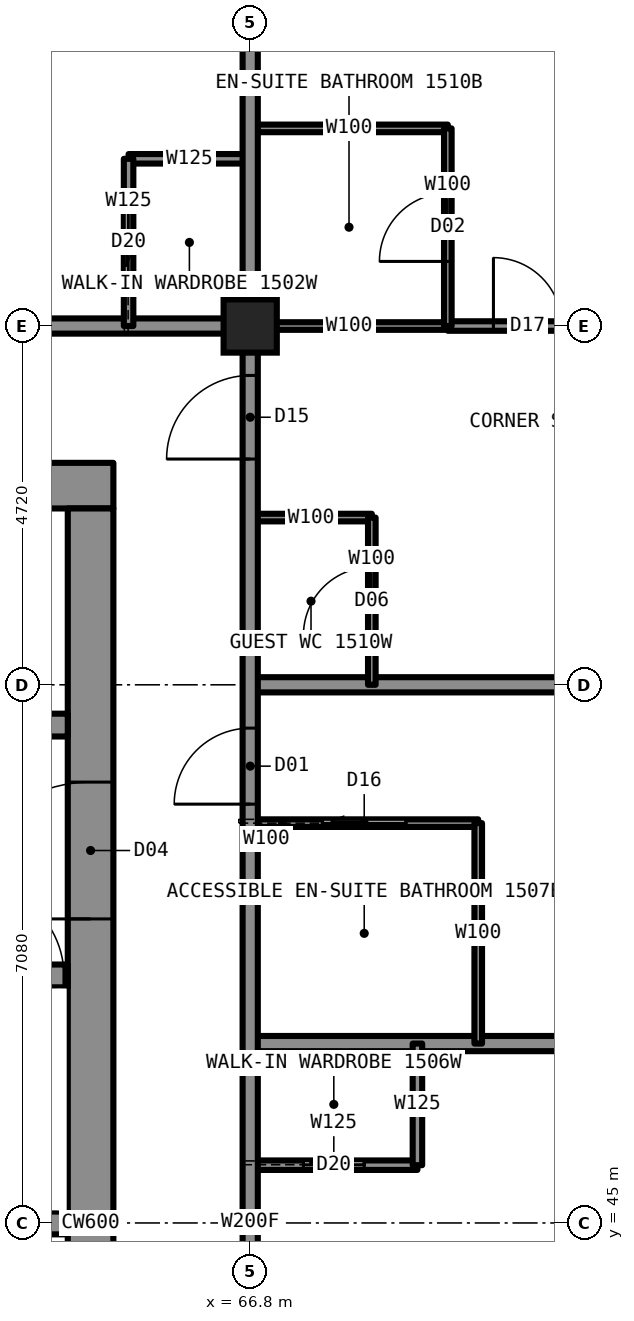
"""IFC4 building model, lengths in metres.
Left out: names, types, materials, properties, quantities, classifications, styles, units other than length and angle.
Written with IfcOpenShell. Run it as: python <this file> out.ifc"""

import sys

from ifc_helpers import new_model, si_unit, direction, frame, frame_2d, origin, origin_2d, place, context, subcontext, project, spatial, rectangle, hollow_rectangle, extrude, element, fill, save


model = new_model("IFC4")
c1 = context("Model", 3, precision=1e-05, world=origin(), true_north=direction((0.0, 1.0)))
c2 = subcontext(c1, "Body", "Model", "MODEL_VIEW")
j1 = project(units=[si_unit("LENGTHUNIT", "METRE"), si_unit("PLANEANGLEUNIT", "RADIAN")], contexts=[c1])
p1 = place(None, origin())
s1 = spatial("IfcSite", under=j1, at=p1, CompositionType="ELEMENT")
p2 = place(p1, origin())
s2 = spatial("IfcBuilding", under=s1, at=p2, CompositionType="ELEMENT")
p3 = place(p2, frame((0.0, 0.0, 60.0)))
s3 = spatial("IfcBuildingStorey", under=s2, at=p3, CompositionType="ELEMENT", Elevation=60.0)
p4 = place(p3, frame((66.8, 56.8, 0.0), z_axis=(0.0, 0.0, 1.0), x_axis=(1.0, 0.0, 0.0)))
e1 = element("IfcColumn", 1, at=p4, inside=s3, PredefinedType="COLUMN", context=c2, shape_type="SweptSolid", body=[
    extrude(hollow_rectangle(XDim=0.7, YDim=0.7, WallThickness=0.06, at=origin_2d()), origin(), (0.0, 0.0, 1.0), 3.5),
])
p5 = place(p3, frame((45.0, 54.7, 0.0), z_axis=(0.0, 0.0, 1.0), x_axis=(1.0, 0.0, 0.0)))
e2 = element("IfcWall", 2, at=p5, inside=s3, PredefinedType="SHEAR", context=c2, shape_type="SweptSolid", body=[
    extrude(rectangle(XDim=20.0, YDim=0.6, at=frame_2d((10.0, 0.0))), origin(), (0.0, 0.0, 1.0), 3.5),
])
p6 = place(p3, frame((64.7, 35.6, 0.0), z_axis=(0.0, 0.0, 1.0), x_axis=(0.0, 1.0, 0.0)))
e3 = element("IfcWall", 3, at=p6, inside=s3, PredefinedType="SHEAR", context=c2, shape_type="SweptSolid", body=[
    extrude(rectangle(XDim=18.8, YDim=0.6, at=frame_2d((9.4, 0.0))), origin(), (0.0, 0.0, 1.0), 3.5),
])
p7 = place(p6, frame((13.4, 0.0, 0.0)))
e4 = element("IfcOpeningElement", 4, at=p7, cuts=e3, PredefinedType="OPENING", context=c2, shape_type="SweptSolid", body=[
    extrude(rectangle(XDim=1.8, YDim=2.2, at=frame_2d((0.9, 1.1))), frame((0.0, 0.31, 0.0), z_axis=(0.0, -1.0, 0.0), x_axis=(1.0, 0.0, 0.0)), (0.0, 0.0, 1.0), 0.62),
])
p8 = place(p6, frame((3.6, 0.0, 0.0)))
e5 = element("IfcOpeningElement", 5, at=p8, cuts=e3, PredefinedType="OPENING", context=c2, shape_type="SweptSolid", body=[
    extrude(rectangle(XDim=1.8, YDim=2.2, at=frame_2d((0.9, 1.1))), frame((0.0, 0.31, 0.0), z_axis=(0.0, -1.0, 0.0), x_axis=(1.0, 0.0, 0.0)), (0.0, 0.0, 1.0), 0.62),
])
p9 = place(p3, frame((45.6, 51.55, 0.0), z_axis=(0.0, 0.0, 1.0), x_axis=(1.0, 0.0, 0.0)))
e6 = element("IfcWall", 6, at=p9, inside=s3, PredefinedType="SHEAR", context=c2, shape_type="SweptSolid", body=[
    extrude(rectangle(XDim=18.8, YDim=0.3, at=frame_2d((9.4, 0.0))), origin(), (0.0, 0.0, 1.0), 3.5),
])
p10 = place(p9, frame((0.7, 0.0, 0.0)))
e7 = element("IfcOpeningElement", 7, at=p10, cuts=e6, PredefinedType="OPENING", context=c2, shape_type="SweptSolid", body=[
    extrude(rectangle(XDim=1.1, YDim=2.2, at=frame_2d((0.55, 1.1))), frame((0.0, 0.16, 0.0), z_axis=(0.0, -1.0, 0.0), x_axis=(1.0, 0.0, 0.0)), (0.0, 0.0, 1.0), 0.32),
])
p11 = place(p9, frame((3.4, 0.0, 0.0)))
e8 = element("IfcOpeningElement", 8, at=p11, cuts=e6, PredefinedType="OPENING", context=c2, shape_type="SweptSolid", body=[
    extrude(rectangle(XDim=1.1, YDim=2.2, at=frame_2d((0.55, 1.1))), frame((0.0, 0.16, 0.0), z_axis=(0.0, -1.0, 0.0), x_axis=(1.0, 0.0, 0.0)), (0.0, 0.0, 1.0), 0.32),
])
p12 = place(p9, frame((6.1, 0.0, 0.0)))
e9 = element("IfcOpeningElement", 9, at=p12, cuts=e6, PredefinedType="OPENING", context=c2, shape_type="SweptSolid", body=[
    extrude(rectangle(XDim=1.1, YDim=2.2, at=frame_2d((0.55, 1.1))), frame((0.0, 0.16, 0.0), z_axis=(0.0, -1.0, 0.0), x_axis=(1.0, 0.0, 0.0)), (0.0, 0.0, 1.0), 0.32),
])
p13 = place(p9, frame((8.8, 0.0, 0.0)))
e10 = element("IfcOpeningElement", 10, at=p13, cuts=e6, PredefinedType="OPENING", context=c2, shape_type="SweptSolid", body=[
    extrude(rectangle(XDim=1.1, YDim=2.2, at=frame_2d((0.55, 1.1))), frame((0.0, 0.16, 0.0), z_axis=(0.0, -1.0, 0.0), x_axis=(1.0, 0.0, 0.0)), (0.0, 0.0, 1.0), 0.32),
])
p14 = place(p9, frame((11.6, 0.0, 0.0)))
e11 = element("IfcOpeningElement", 11, at=p14, cuts=e6, PredefinedType="OPENING", context=c2, shape_type="SweptSolid", body=[
    extrude(rectangle(XDim=1.1, YDim=2.2, at=frame_2d((0.55, 1.1))), frame((0.0, 0.16, 0.0), z_axis=(0.0, -1.0, 0.0), x_axis=(1.0, 0.0, 0.0)), (0.0, 0.0, 1.0), 0.32),
])
p15 = place(p9, frame((14.3, 0.0, 0.0)))
e12 = element("IfcOpeningElement", 12, at=p15, cuts=e6, PredefinedType="OPENING", context=c2, shape_type="SweptSolid", body=[
    extrude(rectangle(XDim=1.1, YDim=2.2, at=frame_2d((0.55, 1.1))), frame((0.0, 0.16, 0.0), z_axis=(0.0, -1.0, 0.0), x_axis=(1.0, 0.0, 0.0)), (0.0, 0.0, 1.0), 0.32),
])
p16 = place(p3, frame((56.2, 48.25, 0.0), z_axis=(0.0, 0.0, 1.0), x_axis=(1.0, 0.0, 0.0)))
e13 = element("IfcWall", 13, at=p16, inside=s3, PredefinedType="SHEAR", context=c2, shape_type="SweptSolid", body=[
    extrude(rectangle(XDim=8.2, YDim=0.3, at=frame_2d((4.1, 0.0))), origin(), (0.0, 0.0, 1.0), 3.5),
])
p17 = place(p16, frame((6.95, 0.0, 0.0)))
e14 = element("IfcOpeningElement", 14, at=p17, cuts=e13, PredefinedType="OPENING", context=c2, shape_type="SweptSolid", body=[
    extrude(rectangle(XDim=1.2, YDim=2.2, at=frame_2d((0.6, 1.1))), frame((0.0, 0.16, 0.0), z_axis=(0.0, -1.0, 0.0), x_axis=(1.0, 0.0, 0.0)), (0.0, 0.0, 1.0), 0.32),
])
p18 = place(p3, frame((56.5, 45.0, 0.0), z_axis=(0.0, 0.0, 1.0), x_axis=(1.0, 0.0, 0.0)))
e15 = element("IfcWall", 15, at=p18, inside=s3, PredefinedType="SHEAR", context=c2, shape_type="SweptSolid", body=[
    extrude(rectangle(XDim=7.9, YDim=0.3, at=frame_2d((3.95, 0.0))), origin(), (0.0, 0.0, 1.0), 3.5),
])
p19 = place(p3, frame((66.8, 45.76, 0.0), z_axis=(0.0, 0.0, 1.0), x_axis=(1.0, 0.0, 0.0)))
e16 = element("IfcWall", 16, at=p19, inside=s3, PredefinedType="PARTITIONING", context=c2, shape_type="SweptSolid", body=[
    extrude(rectangle(XDim=2.2, YDim=0.125, at=frame_2d((1.1, 0.0))), origin(), (0.0, 0.0, 1.0), 3.33),
])
p20 = place(p19, frame((0.7, 0.0, 0.0)))
e17 = element("IfcOpeningElement", 17, at=p20, cuts=e16, PredefinedType="OPENING", context=c2, shape_type="SweptSolid", body=[
    extrude(rectangle(XDim=0.8, YDim=2.1, at=frame_2d((0.4, 1.05))), frame((0.0, 0.073, 0.0), z_axis=(0.0, -1.0, 0.0), x_axis=(1.0, 0.0, 0.0)), (0.0, 0.0, 1.0), 0.145),
])
p21 = place(p3, frame((66.8, 56.8, 0.0), z_axis=(0.0, 0.0, 1.0), x_axis=(1.0, 0.0, 0.0)))
e18 = element("IfcWall", 18, at=p21, inside=s3, PredefinedType="PARTITIONING", context=c2, shape_type="SweptSolid", body=[
    extrude(rectangle(XDim=2.6, YDim=0.1, at=frame_2d((1.3, 0.0))), origin(), (0.0, 0.0, 1.0), 2.573),
])
p22 = place(p3, frame((43.2, 56.8, 0.0), z_axis=(0.0, 0.0, 1.0), x_axis=(1.0, 0.0, 0.0)))
e19 = element("IfcWall", 19, at=p22, inside=s3, PredefinedType="PARTITIONING", context=c2, shape_type="SweptSolid", body=[
    extrude(rectangle(XDim=23.6, YDim=0.2, at=frame_2d((11.8, 0.0))), origin(), (0.0, 0.0, 1.0), 3.33),
])
p23 = place(p22, frame((1.85, 0.0, 0.0)))
e20 = element("IfcOpeningElement", 20, at=p23, cuts=e19, PredefinedType="OPENING", context=c2, shape_type="SweptSolid", body=[
    extrude(rectangle(XDim=1.1, YDim=2.2, at=frame_2d((0.55, 1.1))), frame((0.0, 0.11, 0.0), z_axis=(0.0, -1.0, 0.0), x_axis=(1.0, 0.0, 0.0)), (0.0, 0.0, 1.0), 0.22),
])
p24 = place(p22, frame((17.16, 0.0, 0.0)))
e21 = element("IfcOpeningElement", 21, at=p24, cuts=e19, PredefinedType="OPENING", context=c2, shape_type="SweptSolid", body=[
    extrude(rectangle(XDim=1.0, YDim=2.2, at=frame_2d((0.5, 1.1))), frame((0.0, 0.11, 0.0), z_axis=(0.0, -1.0, 0.0), x_axis=(1.0, 0.0, 0.0)), (0.0, 0.0, 1.0), 0.22),
])
p25 = place(p3, frame((69.4, 56.8, 0.0), z_axis=(0.0, 0.0, 1.0), x_axis=(1.0, 0.0, 0.0)))
e22 = element("IfcWall", 22, at=p25, inside=s3, PredefinedType="PARTITIONING", context=c2, shape_type="SweptSolid", body=[
    extrude(rectangle(XDim=7.3, YDim=0.125, at=frame_2d((3.65, 0.0))), origin(), (0.0, 0.0, 1.0), 2.573),
])
p26 = place(p25, frame((0.6, 0.0, 0.0)))
e23 = element("IfcOpeningElement", 23, at=p26, cuts=e22, PredefinedType="OPENING", context=c2, shape_type="SweptSolid", body=[
    extrude(rectangle(XDim=0.9, YDim=2.2, at=frame_2d((0.45, 1.1))), frame((0.0, 0.073, 0.0), z_axis=(0.0, -1.0, 0.0), x_axis=(1.0, 0.0, 0.0)), (0.0, 0.0, 1.0), 0.145),
])
p27 = place(p25, frame((4.4, 0.0, 0.0)))
e24 = element("IfcOpeningElement", 24, at=p27, cuts=e22, PredefinedType="OPENING", context=c2, shape_type="SweptSolid", body=[
    extrude(rectangle(XDim=0.9, YDim=2.2, at=frame_2d((0.45, 1.1))), frame((0.0, 0.073, 0.0), z_axis=(0.0, -1.0, 0.0), x_axis=(1.0, 0.0, 0.0)), (0.0, 0.0, 1.0), 0.145),
])
p28 = place(p3, frame((65.2, 59.0, 0.0), z_axis=(0.0, 0.0, 1.0), x_axis=(1.0, 0.0, 0.0)))
e25 = element("IfcWall", 25, at=p28, inside=s3, PredefinedType="PARTITIONING", context=c2, shape_type="SweptSolid", body=[
    extrude(rectangle(XDim=1.6, YDim=0.125, at=frame_2d((0.8, 0.0))), origin(), (0.0, 0.0, 1.0), 3.33),
])
p29 = place(p3, frame((66.8, 59.4, 0.0), z_axis=(0.0, 0.0, 1.0), x_axis=(1.0, 0.0, 0.0)))
e26 = element("IfcWall", 26, at=p29, inside=s3, PredefinedType="PARTITIONING", context=c2, shape_type="SweptSolid", body=[
    extrude(rectangle(XDim=2.6, YDim=0.1, at=frame_2d((1.3, 0.0))), origin(), (0.0, 0.0, 1.0), 3.33),
])
p30 = place(p3, frame((66.8, 47.36, 0.0), z_axis=(0.0, 0.0, 1.0), x_axis=(1.0, 0.0, 0.0)))
e27 = element("IfcWall", 27, at=p30, inside=s3, PredefinedType="PARTITIONING", context=c2, shape_type="SweptSolid", body=[
    extrude(rectangle(XDim=9.9, YDim=0.2, at=frame_2d((4.95, 0.0))), origin(), (0.0, 0.0, 1.0), 2.723),
])
p31 = place(p3, frame((66.8, 50.26, 0.0), z_axis=(0.0, 0.0, 1.0), x_axis=(1.0, 0.0, 0.0)))
e28 = element("IfcWall", 28, at=p31, inside=s3, PredefinedType="PARTITIONING", context=c2, shape_type="SweptSolid", body=[
    extrude(rectangle(XDim=3.0, YDim=0.1, at=frame_2d((1.5, 0.0))), origin(), (0.0, 0.0, 1.0), 3.33),
])
p32 = place(p31, frame((0.95, 0.0, 0.0)))
e29 = element("IfcOpeningElement", 29, at=p32, cuts=e28, PredefinedType="OPENING", context=c2, shape_type="SweptSolid", body=[
    extrude(rectangle(XDim=1.1, YDim=2.1, at=frame_2d((0.55, 1.05))), frame((0.0, 0.06, 0.0), z_axis=(0.0, -1.0, 0.0), x_axis=(1.0, 0.0, 0.0)), (0.0, 0.0, 1.0), 0.12),
])
p33 = place(p3, frame((66.8, 52.08, 0.0), z_axis=(0.0, 0.0, 1.0), x_axis=(1.0, 0.0, 0.0)))
e30 = element("IfcWall", 30, at=p33, inside=s3, PredefinedType="PARTITIONING", context=c2, shape_type="SweptSolid", body=[
    extrude(rectangle(XDim=9.9, YDim=0.2, at=frame_2d((4.95, 0.0))), origin(), (0.0, 0.0, 1.0), 2.573),
])
p34 = place(p3, frame((66.8, 54.28, 0.0), z_axis=(0.0, 0.0, 1.0), x_axis=(1.0, 0.0, 0.0)))
e31 = element("IfcWall", 31, at=p34, inside=s3, PredefinedType="PARTITIONING", context=c2, shape_type="SweptSolid", body=[
    extrude(rectangle(XDim=1.6, YDim=0.1, at=frame_2d((0.8, 0.0))), origin(), (0.0, 0.0, 1.0), 2.723),
])
p35 = place(p3, frame((65.2, 56.8, 0.0), z_axis=(0.0, 0.0, 1.0), x_axis=(0.0, 1.0, 0.0)))
e32 = element("IfcWall", 32, at=p35, inside=s3, PredefinedType="PARTITIONING", context=c2, shape_type="SweptSolid", body=[
    extrude(rectangle(XDim=2.2, YDim=0.125, at=frame_2d((1.1, 0.0))), origin(), (0.0, 0.0, 1.0), 3.33),
])
p36 = place(p35, frame((0.7, 0.0, 0.0)))
e33 = element("IfcOpeningElement", 33, at=p36, cuts=e32, PredefinedType="OPENING", context=c2, shape_type="SweptSolid", body=[
    extrude(rectangle(XDim=0.8, YDim=2.1, at=frame_2d((0.4, 1.05))), frame((0.0, 0.073, 0.0), z_axis=(0.0, -1.0, 0.0), x_axis=(1.0, 0.0, 0.0)), (0.0, 0.0, 1.0), 0.145),
])
p37 = place(p3, frame((66.8, 33.22, 0.0), z_axis=(0.0, 0.0, 1.0), x_axis=(0.0, 1.0, 0.0)))
e34 = element("IfcWall", 34, at=p37, inside=s3, PredefinedType="PARTITIONING", context=c2, shape_type="SweptSolid", body=[
    extrude(rectangle(XDim=23.58, YDim=0.2, at=frame_2d((11.79, 0.0))), origin(), (0.0, 0.0, 1.0), 3.33),
])
p38 = place(p37, frame((7.7, 0.0, 0.0)))
e35 = element("IfcOpeningElement", 35, at=p38, cuts=e34, PredefinedType="OPENING", context=c2, shape_type="SweptSolid", body=[
    extrude(rectangle(XDim=1.0, YDim=2.2, at=frame_2d((0.5, 1.1))), frame((0.0, 0.11, 0.0), z_axis=(0.0, -1.0, 0.0), x_axis=(1.0, 0.0, 0.0)), (0.0, 0.0, 1.0), 0.22),
])
p39 = place(p37, frame((17.29, 0.0, 0.0)))
e36 = element("IfcOpeningElement", 36, at=p39, cuts=e34, PredefinedType="OPENING", context=c2, shape_type="SweptSolid", body=[
    extrude(rectangle(XDim=1.0, YDim=2.2, at=frame_2d((0.5, 1.1))), frame((0.0, 0.11, 0.0), z_axis=(0.0, -1.0, 0.0), x_axis=(1.0, 0.0, 0.0)), (0.0, 0.0, 1.0), 0.22),
])
p40 = place(p37, frame((21.83, 0.0, 0.0)))
e37 = element("IfcOpeningElement", 37, at=p40, cuts=e34, PredefinedType="OPENING", context=c2, shape_type="SweptSolid", body=[
    extrude(rectangle(XDim=1.1, YDim=2.2, at=frame_2d((0.55, 1.1))), frame((0.0, 0.11, 0.0), z_axis=(0.0, -1.0, 0.0), x_axis=(1.0, 0.0, 0.0)), (0.0, 0.0, 1.0), 0.22),
])
p41 = place(p37, frame((0.63, 0.0, 0.0)))
e38 = element("IfcOpeningElement", 38, at=p41, cuts=e34, PredefinedType="OPENING", context=c2, shape_type="SweptSolid", body=[
    extrude(rectangle(XDim=1.1, YDim=2.2, at=frame_2d((0.55, 1.1))), frame((0.0, 0.11, 0.0), z_axis=(0.0, -1.0, 0.0), x_axis=(1.0, 0.0, 0.0)), (0.0, 0.0, 1.0), 0.22),
])
p42 = place(p3, frame((66.8, 56.8, 0.0), z_axis=(0.0, 0.0, 1.0), x_axis=(0.0, 1.0, 0.0)))
e39 = element("IfcWall", 39, at=p42, inside=s3, PredefinedType="PARTITIONING", context=c2, shape_type="SweptSolid", body=[
    extrude(rectangle(XDim=9.9, YDim=0.2, at=frame_2d((4.95, 0.0))), origin(), (0.0, 0.0, 1.0), 2.573),
])
p43 = place(p3, frame((68.4, 52.08, 0.0), z_axis=(0.0, 0.0, 1.0), x_axis=(0.0, 1.0, 0.0)))
e40 = element("IfcWall", 40, at=p43, inside=s3, PredefinedType="PARTITIONING", context=c2, shape_type="SweptSolid", body=[
    extrude(rectangle(XDim=2.2, YDim=0.1, at=frame_2d((1.1, 0.0))), origin(), (0.0, 0.0, 1.0), 3.33),
])
p44 = place(p43, frame((0.65, 0.0, 0.0)))
e41 = element("IfcOpeningElement", 41, at=p44, cuts=e40, PredefinedType="OPENING", context=c2, shape_type="SweptSolid", body=[
    extrude(rectangle(XDim=0.9, YDim=2.1, at=frame_2d((0.45, 1.05))), frame((0.0, 0.06, 0.0), z_axis=(0.0, -1.0, 0.0), x_axis=(1.0, 0.0, 0.0)), (0.0, 0.0, 1.0), 0.12),
])
p45 = place(p3, frame((69.0, 45.76, 0.0), z_axis=(0.0, 0.0, 1.0), x_axis=(0.0, 1.0, 0.0)))
e42 = element("IfcWall", 42, at=p45, inside=s3, PredefinedType="PARTITIONING", context=c2, shape_type="SweptSolid", body=[
    extrude(rectangle(XDim=1.6, YDim=0.125, at=frame_2d((0.8, 0.0))), origin(), (0.0, 0.0, 1.0), 3.33),
])
p46 = place(p3, frame((69.4, 56.8, 0.0), z_axis=(0.0, 0.0, 1.0), x_axis=(0.0, 1.0, 0.0)))
e43 = element("IfcWall", 43, at=p46, inside=s3, PredefinedType="PARTITIONING", context=c2, shape_type="SweptSolid", body=[
    extrude(rectangle(XDim=2.6, YDim=0.1, at=frame_2d((1.3, 0.0))), origin(), (0.0, 0.0, 1.0), 3.33),
])
p47 = place(p46, frame((0.85, 0.0, 0.0)))
e44 = element("IfcOpeningElement", 44, at=p47, cuts=e43, PredefinedType="OPENING", context=c2, shape_type="SweptSolid", body=[
    extrude(rectangle(XDim=0.9, YDim=2.1, at=frame_2d((0.45, 1.05))), frame((0.0, 0.06, 0.0), z_axis=(0.0, -1.0, 0.0), x_axis=(1.0, 0.0, 0.0)), (0.0, 0.0, 1.0), 0.12),
])
p48 = place(p3, frame((69.8, 47.36, 0.0), z_axis=(0.0, 0.0, 1.0), x_axis=(0.0, 1.0, 0.0)))
e45 = element("IfcWall", 45, at=p48, inside=s3, PredefinedType="PARTITIONING", context=c2, shape_type="SweptSolid", body=[
    extrude(rectangle(XDim=2.9, YDim=0.1, at=frame_2d((1.45, 0.0))), origin(), (0.0, 0.0, 1.0), 3.33),
])
p49 = place(p36, origin())
e46 = element("IfcDoor", 46, at=p49, inside=s3, OperationType="SLIDING_TO_LEFT", PredefinedType="DOOR", context=c2, shape_type="SweptSolid", body=[
    extrude(rectangle(XDim=0.8, YDim=2.1, at=frame_2d((0.4, 1.05))), frame((0.0, 0.025, 0.0), z_axis=(0.0, -1.0, 0.0), x_axis=(1.0, 0.0, 0.0)), (0.0, 0.0, 1.0), 0.05),
])
fill(e33, e46)
p50 = place(p20, origin())
e47 = element("IfcDoor", 47, at=p50, inside=s3, OperationType="SLIDING_TO_LEFT", PredefinedType="DOOR", context=c2, shape_type="SweptSolid", body=[
    extrude(rectangle(XDim=0.8, YDim=2.1, at=frame_2d((0.4, 1.05))), frame((0.0, 0.025, 0.0), z_axis=(0.0, -1.0, 0.0), x_axis=(1.0, 0.0, 0.0)), (0.0, 0.0, 1.0), 0.05),
])
fill(e17, e47)
p51 = place(p39, origin())
e48 = element("IfcDoor", 48, at=p51, inside=s3, OperationType="SINGLE_SWING_LEFT", PredefinedType="DOOR", context=c2, shape_type="SweptSolid", body=[
    extrude(rectangle(XDim=1.0, YDim=2.2, at=frame_2d((0.5, 1.1))), frame((0.0, 0.025, 0.0), z_axis=(0.0, -1.0, 0.0), x_axis=(1.0, 0.0, 0.0)), (0.0, 0.0, 1.0), 0.05),
])
fill(e36, e48)
p52 = place(p32, origin())
e49 = element("IfcDoor", 49, at=p52, inside=s3, OperationType="SLIDING_TO_LEFT", PredefinedType="DOOR", context=c2, shape_type="SweptSolid", body=[
    extrude(rectangle(XDim=1.1, YDim=2.1, at=frame_2d((0.55, 1.05))), frame((0.0, 0.025, 0.0), z_axis=(0.0, -1.0, 0.0), x_axis=(1.0, 0.0, 0.0)), (0.0, 0.0, 1.0), 0.05),
])
fill(e29, e49)
p53 = place(p40, origin())
e50 = element("IfcDoor", 50, at=p53, inside=s3, OperationType="SINGLE_SWING_LEFT", PredefinedType="DOOR", context=c2, shape_type="SweptSolid", body=[
    extrude(rectangle(XDim=1.1, YDim=2.2, at=frame_2d((0.55, 1.1))), frame((0.0, 0.025, 0.0), z_axis=(0.0, -1.0, 0.0), x_axis=(1.0, 0.0, 0.0)), (0.0, 0.0, 1.0), 0.05),
])
fill(e37, e50)
p54 = place(p47, origin())
e51 = element("IfcDoor", 51, at=p54, inside=s3, OperationType="SINGLE_SWING_RIGHT", PredefinedType="DOOR", context=c2, shape_type="SweptSolid", body=[
    extrude(rectangle(XDim=0.9, YDim=2.1, at=frame_2d((0.45, 1.05))), frame((0.0, 0.025, 0.0), z_axis=(0.0, -1.0, 0.0), x_axis=(1.0, 0.0, 0.0)), (0.0, 0.0, 1.0), 0.05),
])
fill(e44, e51)
p55 = place(p26, origin())
e52 = element("IfcDoor", 52, at=p55, inside=s3, OperationType="SINGLE_SWING_LEFT", PredefinedType="DOOR", context=c2, shape_type="SweptSolid", body=[
    extrude(rectangle(XDim=0.9, YDim=2.2, at=frame_2d((0.45, 1.1))), frame((0.0, 0.025, 0.0), z_axis=(0.0, -1.0, 0.0), x_axis=(1.0, 0.0, 0.0)), (0.0, 0.0, 1.0), 0.05),
])
fill(e23, e52)
p56 = place(p44, origin())
e53 = element("IfcDoor", 53, at=p56, inside=s3, OperationType="SINGLE_SWING_LEFT", PredefinedType="DOOR", context=c2, shape_type="SweptSolid", body=[
    extrude(rectangle(XDim=0.9, YDim=2.1, at=frame_2d((0.45, 1.05))), frame((0.0, 0.025, 0.0), z_axis=(0.0, -1.0, 0.0), x_axis=(1.0, 0.0, 0.0)), (0.0, 0.0, 1.0), 0.05),
])
fill(e41, e53)
p57 = place(p7, origin())
e54 = element("IfcDoor", 54, at=p57, inside=s3, OperationType="DOUBLE_DOOR_SINGLE_SWING", PredefinedType="DOOR", context=c2, shape_type="SweptSolid", body=[
    extrude(rectangle(XDim=1.8, YDim=2.2, at=frame_2d((0.9, 1.1))), frame((0.0, 0.025, 0.0), z_axis=(0.0, -1.0, 0.0), x_axis=(1.0, 0.0, 0.0)), (0.0, 0.0, 1.0), 0.05),
])
fill(e4, e54)
p58 = place(p17, origin())
e55 = element("IfcDoor", 55, at=p58, inside=s3, OperationType="SINGLE_SWING_LEFT", PredefinedType="DOOR", context=c2, shape_type="SweptSolid", body=[
    extrude(rectangle(XDim=1.2, YDim=2.2, at=frame_2d((0.6, 1.1))), frame((0.0, 0.025, 0.0), z_axis=(0.0, -1.0, 0.0), x_axis=(1.0, 0.0, 0.0)), (0.0, 0.0, 1.0), 0.05),
])
fill(e14, e55)
save(model, sys.argv[1])
